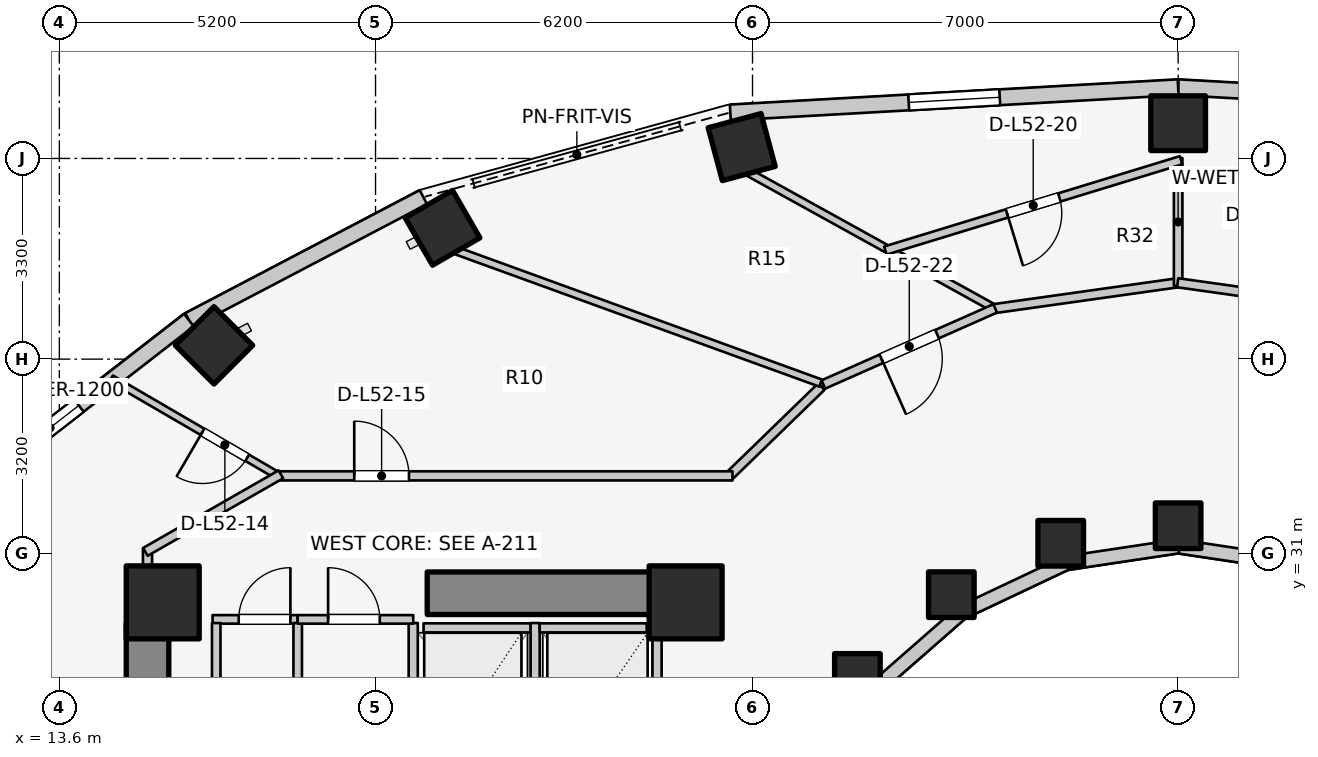
"""IFC4 building model, lengths in metres.
Left out: names, types, materials, properties, quantities, classifications, styles, units other than length and angle.
Written with IfcOpenShell. Run it as: python <this file> out.ifc"""

import sys

from ifc_helpers import new_model, si_unit, direction, frame, frame_2d, origin, origin_2d, place, context, subcontext, project, spatial, rectangle, extrude, element, fill, save


model = new_model("IFC4")
c1 = context("Model", 3, precision=1e-05, world=origin(), true_north=direction((0.0, 1.0)))
c2 = subcontext(c1, "Body", "Model", "MODEL_VIEW")
j1 = project(units=[si_unit("LENGTHUNIT", "METRE"), si_unit("PLANEANGLEUNIT", "RADIAN")], contexts=[c1])
p1 = place(None, origin())
s1 = spatial("IfcSite", under=j1, at=p1, CompositionType="ELEMENT")
p2 = place(p1, origin())
s2 = spatial("IfcBuilding", under=s1, at=p2, CompositionType="ELEMENT")
p3 = place(p2, frame((0.0, 0.0, 171.5)))
s3 = spatial("IfcBuildingStorey", under=s2, at=p3, CompositionType="ELEMENT", Elevation=171.5)
p4 = place(p3, frame((15.05, 17.05, 0.0), z_axis=(0.0, 0.0, 1.0), x_axis=(0.0, 1.0, 0.0)))
e1 = element("IfcWall", 1, at=p4, inside=s3, PredefinedType="SHEAR", context=c2, shape_type="SweptSolid", body=[
    extrude(rectangle(XDim=12.8, YDim=0.7, at=frame_2d((6.4, 0.0))), origin(), (0.0, 0.0, 1.0), 3.1),
])
p5 = place(p3, frame((19.65, 30.35, 0.0), z_axis=(0.0, 0.0, 1.0), x_axis=(1.0, 0.0, 0.0)))
e2 = element("IfcWall", 2, at=p5, inside=s3, PredefinedType="SHEAR", context=c2, shape_type="SweptSolid", body=[
    extrude(rectangle(XDim=4.5, YDim=0.7, at=frame_2d((2.25, 0.0))), origin(), (0.0, 0.0, 1.0), 3.1),
])
for number, where, z_axis, x_axis in (
    (3, (23.9, 30.2, 0.0), (0.0, 0.0, 1.0), (1.0, 0.0, 0.0)),
    (4, (15.3, 30.2, 0.0), (0.0, 0.0, 1.0), (1.0, 0.0, 0.0)),
):
    element("IfcColumn", number, at=place(p3, frame(where, z_axis=z_axis, x_axis=x_axis)), inside=s3, PredefinedType="COLUMN", context=c2, shape_type="SweptSolid", body=[
        extrude(rectangle(XDim=1.2, YDim=1.2, at=origin_2d()), origin(), (0.0, 0.0, 1.0), 3.1),
    ])
p6 = place(p3, frame((32.0, 31.46, 0.0), z_axis=(0.0, 0.0, 1.0), x_axis=(1.0, 0.0, 0.0)))
e5 = element("IfcColumn", 5, at=p6, inside=s3, PredefinedType="COLUMN", context=c2, shape_type="SweptSolid", body=[
    extrude(rectangle(XDim=0.75, YDim=0.75, at=origin_2d()), origin(), (0.0, 0.0, 1.0), 3.1),
])
p7 = place(p3, frame((32.0, 38.08, 0.0), z_axis=(0.0, 0.0, 1.0), x_axis=(0.0, 1.0, 0.0)))
e6 = element("IfcColumn", 6, at=p7, inside=s3, PredefinedType="COLUMN", context=c2, shape_type="SweptSolid", body=[
    extrude(rectangle(XDim=0.9, YDim=0.9, at=origin_2d()), origin(), (0.0, 0.0, 1.0), 3.1),
])
p8 = place(p3, frame((30.069, 31.172, 0.0), z_axis=(0.0, 0.0, 1.0), x_axis=(1.0, 0.0, 0.0)))
e7 = element("IfcColumn", 7, at=p8, inside=s3, PredefinedType="COLUMN", context=c2, shape_type="SweptSolid", body=[
    extrude(rectangle(XDim=0.75, YDim=0.75, at=origin_2d()), origin(), (0.0, 0.0, 1.0), 3.1),
])
p9 = place(p3, frame((24.822, 37.687, 0.0), z_axis=(0.0, 0.0, 1.0), x_axis=(-0.258819045103, 0.965925826289, 0.0)))
e8 = element("IfcColumn", 8, at=p9, inside=s3, PredefinedType="COLUMN", context=c2, shape_type="SweptSolid", body=[
    extrude(rectangle(XDim=0.9, YDim=0.9, at=origin_2d()), origin(), (0.0, 0.0, 1.0), 3.1),
])
p10 = place(p3, frame((28.27, 30.327, 0.0), z_axis=(0.0, 0.0, 1.0), x_axis=(1.0, 0.0, 0.0)))
e9 = element("IfcColumn", 9, at=p10, inside=s3, PredefinedType="COLUMN", context=c2, shape_type="SweptSolid", body=[
    extrude(rectangle(XDim=0.75, YDim=0.75, at=origin_2d()), origin(), (0.0, 0.0, 1.0), 3.1),
])
p11 = place(p3, frame((19.902, 36.359, 0.0), z_axis=(0.0, 0.0, 1.0), x_axis=(-0.5, 0.866025403784, 0.0)))
e10 = element("IfcColumn", 10, at=p11, inside=s3, PredefinedType="COLUMN", context=c2, shape_type="SweptSolid", body=[
    extrude(rectangle(XDim=0.9, YDim=0.9, at=origin_2d()), origin(), (0.0, 0.0, 1.0), 3.1),
])
p12 = place(p3, frame((26.725, 28.982, 0.0), z_axis=(0.0, 0.0, 1.0), x_axis=(1.0, 0.0, 0.0)))
e11 = element("IfcColumn", 11, at=p12, inside=s3, PredefinedType="COLUMN", context=c2, shape_type="SweptSolid", body=[
    extrude(rectangle(XDim=0.75, YDim=0.75, at=origin_2d()), origin(), (0.0, 0.0, 1.0), 3.1),
])
p13 = place(p3, frame((16.143, 34.427, 0.0), z_axis=(0.0, 0.0, 1.0), x_axis=(-0.707106781187, 0.707106781187, 0.0)))
e12 = element("IfcColumn", 12, at=p13, inside=s3, PredefinedType="COLUMN", context=c2, shape_type="SweptSolid", body=[
    extrude(rectangle(XDim=0.9, YDim=0.9, at=origin_2d()), origin(), (0.0, 0.0, 1.0), 3.1),
])
for number, where, z_axis, x_axis in (
    (13, (33.843, 30.843, 0.0), (0.0, 0.0, 1.0), (-0.989, 0.149, 0.0)),
    (14, (32.0, 31.12, 0.0), (0.0, 0.0, 1.0), (-0.989, -0.149, 0.0)),
):
    element("IfcWall", number, at=place(p3, frame(where, z_axis=z_axis, x_axis=x_axis)), inside=s3, PredefinedType="STANDARD", context=c2, shape_type="SweptSolid", body=[
        extrude(rectangle(XDim=1.864, YDim=0.23, at=frame_2d((0.932, 0.0))), origin(), (0.0, 0.0, 1.0), 2.16),
    ])
p14 = place(p3, frame((30.157, 30.843, 0.0), z_axis=(0.0, 0.0, 1.0), x_axis=(-0.904179699603, -0.427152280606, 0.0)))
e15 = element("IfcWall", 15, at=p14, inside=s3, PredefinedType="STANDARD", context=c2, shape_type="SweptSolid", body=[
    extrude(rectangle(XDim=1.899, YDim=0.23, at=frame_2d((0.95, 0.0))), origin(), (0.0, 0.0, 1.0), 2.16),
])
p15 = place(p3, frame((28.44, 30.032, 0.0), z_axis=(0.0, 0.0, 1.0), x_axis=(-0.752576694707, -0.658504607869, 0.0)))
e16 = element("IfcWall", 16, at=p15, inside=s3, PredefinedType="STANDARD", context=c2, shape_type="SweptSolid", body=[
    extrude(rectangle(XDim=1.959, YDim=0.23, at=frame_2d((0.98, 0.0))), origin(), (0.0, 0.0, 1.0), 2.16),
])
p16 = place(p3, frame((39.365, 38.257, 0.0), z_axis=(0.0, 0.0, 1.0), x_axis=(-0.998417906562, 0.056228852534, 0.0)))
e17 = element("IfcWall", 17, at=p16, inside=s3, PredefinedType="STANDARD", context=c2, shape_type="SweptSolid", body=[
    extrude(rectangle(XDim=7.377, YDim=0.26, at=frame_2d((3.688, 0.0))), origin(), (0.0, 0.0, 1.0), 2.85),
])
p17 = place(p16, frame((2.488, 0.0, 0.75)))
e18 = element("IfcOpeningElement", 18, at=p17, cuts=e17, PredefinedType="OPENING", context=c2, shape_type="SweptSolid", body=[
    extrude(rectangle(XDim=2.4, YDim=1.7, at=frame_2d((1.2, 0.85))), frame((0.0, 0.14, 0.0), z_axis=(0.0, -1.0, 0.0), x_axis=(1.0, 0.0, 0.0)), (0.0, 0.0, 1.0), 0.28),
])
p18 = place(p3, frame((32.0, 38.671, 0.0), z_axis=(0.0, 0.0, 1.0), x_axis=(-0.998417906562, -0.056228852534, 0.0)))
e19 = element("IfcWall", 19, at=p18, inside=s3, PredefinedType="STANDARD", context=c2, shape_type="SweptSolid", body=[
    extrude(rectangle(XDim=7.377, YDim=0.26, at=frame_2d((3.688, 0.0))), origin(), (0.0, 0.0, 1.0), 2.85),
])
p19 = place(p18, frame((2.938, 0.0, 0.75)))
e20 = element("IfcOpeningElement", 20, at=p19, cuts=e19, PredefinedType="OPENING", context=c2, shape_type="SweptSolid", body=[
    extrude(rectangle(XDim=1.5, YDim=1.6, at=frame_2d((0.75, 0.8))), frame((0.0, 0.14, 0.0), z_axis=(0.0, -1.0, 0.0), x_axis=(1.0, 0.0, 0.0)), (0.0, 0.0, 1.0), 0.28),
])
p20 = place(p3, frame((19.587, 36.863, 0.0), z_axis=(0.0, 0.0, 1.0), x_axis=(-0.885660265226, -0.464333818065, 0.0)))
e21 = element("IfcWall", 21, at=p20, inside=s3, PredefinedType="STANDARD", context=c2, shape_type="SweptSolid", body=[
    extrude(rectangle(XDim=4.354, YDim=0.26, at=frame_2d((2.177, 0.0))), origin(), (0.0, 0.0, 1.0), 2.85),
])
p21 = place(p3, frame((15.731, 34.842, 0.0), z_axis=(0.0, 0.0, 1.0), x_axis=(-0.790185650662, -0.612867552973, 0.0)))
e22 = element("IfcWall", 22, at=p21, inside=s3, PredefinedType="STANDARD", context=c2, shape_type="SweptSolid", body=[
    extrude(rectangle(XDim=4.239, YDim=0.26, at=frame_2d((2.12, 0.0))), origin(), (0.0, 0.0, 1.0), 2.85),
])
p22 = place(p21, frame((2.29, 0.0, 0.75)))
e23 = element("IfcOpeningElement", 23, at=p22, cuts=e22, PredefinedType="OPENING", context=c2, shape_type="SweptSolid", body=[
    extrude(rectangle(XDim=1.2, YDim=1.5, at=frame_2d((0.6, 0.75))), frame((0.0, 0.14, 0.0), z_axis=(0.0, -1.0, 0.0), x_axis=(1.0, 0.0, 0.0)), (0.0, 0.0, 1.0), 0.28),
])
p23 = place(p3, frame((19.59, 29.78, 0.0), z_axis=(0.0, 0.0, 1.0), x_axis=(1.0, 0.0, 0.0)))
e24 = element("IfcWall", 24, at=p23, inside=s3, PredefinedType="SOLIDWALL", context=c2, shape_type="SweptSolid", body=[
    extrude(rectangle(XDim=1.76, YDim=0.15, at=frame_2d((0.88, 0.0))), origin(), (0.0, 0.0, 1.0), 2.855),
])
for number, where, z_axis, x_axis in (
    (25, (19.42, 27.14, 0.0), (0.0, 0.0, 1.0), (0.0, 1.0, 0.0)),
    (26, (21.425, 27.14, 0.0), (0.0, 0.0, 1.0), (0.0, 1.0, 0.0)),
):
    element("IfcWall", number, at=place(p3, frame(where, z_axis=z_axis, x_axis=x_axis)), inside=s3, PredefinedType="SOLIDWALL", context=c2, shape_type="SweptSolid", body=[
        extrude(rectangle(XDim=2.72, YDim=0.15, at=frame_2d((1.36, 0.0))), origin(), (0.0, 0.0, 1.0), 2.855),
    ])
p24 = place(p3, frame((21.5, 29.78, 0.0), z_axis=(0.0, 0.0, 1.0), x_axis=(1.0, 0.0, 0.0)))
e27 = element("IfcWall", 27, at=p24, inside=s3, PredefinedType="SOLIDWALL", context=c2, shape_type="SweptSolid", body=[
    extrude(rectangle(XDim=1.76, YDim=0.15, at=frame_2d((0.88, 0.0))), origin(), (0.0, 0.0, 1.0), 2.855),
])
p25 = place(p3, frame((23.43, 27.14, 0.0), z_axis=(0.0, 0.0, 1.0), x_axis=(0.0, 1.0, 0.0)))
e28 = element("IfcWall", 28, at=p25, inside=s3, PredefinedType="SOLIDWALL", context=c2, shape_type="SweptSolid", body=[
    extrude(rectangle(XDim=2.72, YDim=0.15, at=frame_2d((1.36, 0.0))), origin(), (0.0, 0.0, 1.0), 2.855),
])
p26 = place(p3, frame((16.12, 29.92, 0.0), z_axis=(0.0, 0.0, 1.0), x_axis=(1.0, 0.0, 0.0)))
e29 = element("IfcWall", 29, at=p26, inside=s3, PredefinedType="PLUMBINGWALL", context=c2, shape_type="SweptSolid", body=[
    extrude(rectangle(XDim=1.4, YDim=0.14, at=frame_2d((0.7, 0.0))), origin(), (0.0, 0.0, 1.0), 2.855),
])
p27 = place(p26, frame((0.43, 0.0, 0.0)))
e30 = element("IfcOpeningElement", 30, at=p27, cuts=e29, PredefinedType="OPENING", context=c2, shape_type="SweptSolid", body=[
    extrude(rectangle(XDim=0.85, YDim=2.05, at=frame_2d((0.425, 1.025))), frame((0.0, 0.08, 0.0), z_axis=(0.0, -1.0, 0.0), x_axis=(1.0, 0.0, 0.0)), (0.0, 0.0, 1.0), 0.16),
])
for number, where, z_axis, x_axis in (
    (31, (16.18, 25.98, 0.0), (0.0, 0.0, 1.0), (0.0, 1.0, 0.0)),
    (32, (17.52, 25.98, 0.0), (0.0, 0.0, 1.0), (0.0, 1.0, 0.0)),
):
    element("IfcWall", number, at=place(p3, frame(where, z_axis=z_axis, x_axis=x_axis)), inside=s3, PredefinedType="PLUMBINGWALL", context=c2, shape_type="SweptSolid", body=[
        extrude(rectangle(XDim=3.88, YDim=0.14, at=frame_2d((1.94, 0.0))), origin(), (0.0, 0.0, 1.0), 2.855),
    ])
p28 = place(p3, frame((17.52, 29.92, 0.0), z_axis=(0.0, 0.0, 1.0), x_axis=(1.0, 0.0, 0.0)))
e33 = element("IfcWall", 33, at=p28, inside=s3, PredefinedType="PLUMBINGWALL", context=c2, shape_type="SweptSolid", body=[
    extrude(rectangle(XDim=1.9, YDim=0.14, at=frame_2d((0.95, 0.0))), origin(), (0.0, 0.0, 1.0), 2.855),
])
p29 = place(p28, frame((0.5, 0.0, 0.0)))
e34 = element("IfcOpeningElement", 34, at=p29, cuts=e33, PredefinedType="OPENING", context=c2, shape_type="SweptSolid", body=[
    extrude(rectangle(XDim=0.85, YDim=2.05, at=frame_2d((0.425, 1.025))), frame((0.0, 0.08, 0.0), z_axis=(0.0, -1.0, 0.0), x_axis=(1.0, 0.0, 0.0)), (0.0, 0.0, 1.0), 0.16),
])
p30 = place(p3, frame((15.05, 29.8, 0.0), z_axis=(0.0, 0.0, 1.0), x_axis=(0.0, 1.0, 0.0)))
e35 = element("IfcWall", 35, at=p30, inside=s3, PredefinedType="PARTITIONING", context=c2, shape_type="SweptSolid", body=[
    extrude(rectangle(XDim=1.29, YDim=0.15, at=frame_2d((0.645, 0.0))), origin(), (0.0, 0.0, 1.0), 2.855),
])
p31 = place(p3, frame((17.243, 32.255, 0.0), z_axis=(0.0, 0.0, 1.0), x_axis=(-0.864408655832, 0.502789892224, 0.0)))
e36 = element("IfcWall", 36, at=p31, inside=s3, PredefinedType="MOVABLE", context=c2, shape_type="SweptSolid", body=[
    extrude(rectangle(XDim=3.23, YDim=0.12, at=frame_2d((1.615, 0.0))), origin(), (0.0, 0.0, 1.0), 2.22),
])
p32 = place(p31, frame((0.641, 0.0, 0.0)))
e37 = element("IfcOpeningElement", 37, at=p32, cuts=e36, PredefinedType="OPENING", context=c2, shape_type="SweptSolid", body=[
    extrude(rectangle(XDim=0.85, YDim=2.05, at=frame_2d((0.425, 1.025))), frame((0.0, 0.07, 0.0), z_axis=(0.0, -1.0, 0.0), x_axis=(1.0, 0.0, 0.0)), (0.0, 0.0, 1.0), 0.14),
])
p33 = place(p3, frame((26.133, 33.749, 0.0), z_axis=(0.0, 0.0, 1.0), x_axis=(-0.717419568599, -0.696641344302, 0.0)))
e38 = element("IfcWall", 38, at=p33, inside=s3, PredefinedType="PARTITIONING", context=c2, shape_type="SweptSolid", body=[
    extrude(rectangle(XDim=2.138, YDim=0.15, at=frame_2d((1.069, 0.0))), origin(), (0.0, 0.0, 1.0), 2.299),
])
p34 = place(p3, frame((17.15, 32.28, 0.0), z_axis=(0.0, 0.0, 1.0), x_axis=(1.0, 0.0, 0.0)))
e39 = element("IfcWall", 39, at=p34, inside=s3, PredefinedType="PARTITIONING", context=c2, shape_type="SweptSolid", body=[
    extrude(rectangle(XDim=7.52, YDim=0.15, at=frame_2d((3.76, 0.0))), origin(), (0.0, 0.0, 1.0), 2.299),
])
p35 = place(p34, frame((1.3, 0.0, 0.0)))
e40 = element("IfcOpeningElement", 40, at=p35, cuts=e39, PredefinedType="OPENING", context=c2, shape_type="SweptSolid", body=[
    extrude(rectangle(XDim=0.9, YDim=2.1, at=frame_2d((0.45, 1.05))), frame((0.0, 0.085, 0.0), z_axis=(0.0, -1.0, 0.0), x_axis=(1.0, 0.0, 0.0)), (0.0, 0.0, 1.0), 0.17),
])
p36 = place(p3, frame((17.243, 32.305, 0.0), z_axis=(0.0, 0.0, 1.0), x_axis=(-0.867991349648, -0.496579315857, 0.0)))
e41 = element("IfcWall", 41, at=p36, inside=s3, PredefinedType="PARTITIONING", context=c2, shape_type="SweptSolid", body=[
    extrude(rectangle(XDim=2.567, YDim=0.15, at=frame_2d((1.283, 0.0))), origin(), (0.0, 0.0, 1.0), 2.22),
])
p37 = place(p3, frame((28.935, 35.058, 0.0), z_axis=(0.0, 0.0, 1.0), x_axis=(-0.875077338582, 0.48398311076, 0.0)))
e42 = element("IfcWall", 42, at=p37, inside=s3, PredefinedType="PARTITIONING", context=c2, shape_type="SweptSolid", body=[
    extrude(rectangle(XDim=4.573, YDim=0.125, at=frame_2d((2.287, 0.0))), origin(), (0.0, 0.0, 1.0), 2.299),
])
p38 = place(p3, frame((26.12, 33.806, 0.0), z_axis=(0.0, 0.0, 1.0), x_axis=(-0.939901628116, 0.341445353557, 0.0)))
e43 = element("IfcWall", 43, at=p38, inside=s3, PredefinedType="PARTITIONING", context=c2, shape_type="SweptSolid", body=[
    extrude(rectangle(XDim=6.387, YDim=0.125, at=frame_2d((3.194, 0.0))), origin(), (0.0, 0.0, 1.0), 2.299),
])
p39 = place(p3, frame((32.05, 35.463, 0.0), z_axis=(0.0, 0.0, 1.0), x_axis=(-0.990254405439, -0.139270285808, 0.0)))
e44 = element("IfcWall", 44, at=p39, inside=s3, PredefinedType="PARTITIONING", context=c2, shape_type="SweptSolid", body=[
    extrude(rectangle(XDim=3.147, YDim=0.15, at=frame_2d((1.573, 0.0))), origin(), (0.0, 0.0, 1.0), 2.299),
])
p40 = place(p3, frame((32.0, 35.406, 0.0), z_axis=(0.0, 0.0, 1.0), x_axis=(0.0, 1.0, 0.0)))
e45 = element("IfcWall", 45, at=p40, inside=s3, PredefinedType="PLUMBINGWALL", context=c2, shape_type="SweptSolid", body=[
    extrude(rectangle(XDim=2.1, YDim=0.14, at=frame_2d((1.05, 0.0))), origin(), (0.0, 0.0, 1.0), 2.299),
])
p41 = place(p3, frame((32.048, 37.471, 0.0), z_axis=(0.0, 0.0, 1.0), x_axis=(-0.956348216259, -0.292229514694, 0.0)))
e46 = element("IfcWall", 46, at=p41, inside=s3, PredefinedType="PLUMBINGWALL", context=c2, shape_type="SweptSolid", body=[
    extrude(rectangle(XDim=5.084, YDim=0.14, at=frame_2d((2.542, 0.0))), origin(), (0.0, 0.0, 1.0), 2.299),
])
p42 = place(p41, frame((2.092, 0.0, 0.0)))
e47 = element("IfcOpeningElement", 47, at=p42, cuts=e46, PredefinedType="OPENING", context=c2, shape_type="SweptSolid", body=[
    extrude(rectangle(XDim=0.9, YDim=2.1, at=frame_2d((0.45, 1.05))), frame((0.0, 0.08, 0.0), z_axis=(0.0, -1.0, 0.0), x_axis=(1.0, 0.0, 0.0)), (0.0, 0.0, 1.0), 0.16),
])
p43 = place(p3, frame((35.025, 35.029, 0.0), z_axis=(0.0, 0.0, 1.0), x_axis=(-0.990243864279, 0.139345216129, 0.0)))
e48 = element("IfcWall", 48, at=p43, inside=s3, PredefinedType="PARTITIONING", context=c2, shape_type="SweptSolid", body=[
    extrude(rectangle(XDim=3.062, YDim=0.15, at=frame_2d((1.531, 0.0))), origin(), (0.0, 0.0, 1.0), 2.299),
])
p44 = place(p43, frame((1.031, 0.0, 0.0)))
e49 = element("IfcOpeningElement", 49, at=p44, cuts=e48, PredefinedType="OPENING", context=c2, shape_type="SweptSolid", body=[
    extrude(rectangle(XDim=1.0, YDim=2.1, at=frame_2d((0.5, 1.05))), frame((0.0, 0.085, 0.0), z_axis=(0.0, -1.0, 0.0), x_axis=(1.0, 0.0, 0.0)), (0.0, 0.0, 1.0), 0.17),
])
p45 = place(p3, frame((28.991, 35.034, 0.0), z_axis=(0.0, 0.0, 1.0), x_axis=(-0.91445214467, -0.404694051239, 0.0)))
e50 = element("IfcWall", 50, at=p45, inside=s3, PredefinedType="PARTITIONING", context=c2, shape_type="SweptSolid", body=[
    extrude(rectangle(XDim=3.091, YDim=0.15, at=frame_2d((1.545, 0.0))), origin(), (0.0, 0.0, 1.0), 2.299),
])
p46 = place(p45, frame((1.045, 0.0, 0.0)))
e51 = element("IfcOpeningElement", 51, at=p46, cuts=e50, PredefinedType="OPENING", context=c2, shape_type="SweptSolid", body=[
    extrude(rectangle(XDim=1.0, YDim=2.1, at=frame_2d((0.5, 1.05))), frame((0.0, 0.085, 0.0), z_axis=(0.0, -1.0, 0.0), x_axis=(1.0, 0.0, 0.0)), (0.0, 0.0, 1.0), 0.17),
])
p47 = place(p19, origin())
e52 = element("IfcWindow", 52, at=p47, inside=s3, PartitioningType="SINGLE_PANEL", PredefinedType="WINDOW", context=c2, shape_type="SweptSolid", body=[
    extrude(rectangle(XDim=1.5, YDim=1.6, at=frame_2d((0.75, 0.8))), frame((0.0, 0.03, 0.0), z_axis=(0.0, -1.0, 0.0), x_axis=(1.0, 0.0, 0.0)), (0.0, 0.0, 1.0), 0.06),
])
fill(e20, e52)
p48 = place(p22, origin())
e53 = element("IfcWindow", 53, at=p48, inside=s3, PartitioningType="SINGLE_PANEL", PredefinedType="WINDOW", context=c2, shape_type="SweptSolid", body=[
    extrude(rectangle(XDim=1.2, YDim=1.5, at=frame_2d((0.6, 0.75))), frame((0.0, 0.03, 0.0), z_axis=(0.0, -1.0, 0.0), x_axis=(1.0, 0.0, 0.0)), (0.0, 0.0, 1.0), 0.06),
])
fill(e23, e53)
p49 = place(p27, origin())
e54 = element("IfcDoor", 54, at=p49, inside=s3, OperationType="SINGLE_SWING_RIGHT", PredefinedType="DOOR", context=c2, shape_type="SweptSolid", body=[
    extrude(rectangle(XDim=0.85, YDim=2.05, at=frame_2d((0.425, 1.025))), frame((0.0, 0.025, 0.0), z_axis=(0.0, -1.0, 0.0), x_axis=(1.0, 0.0, 0.0)), (0.0, 0.0, 1.0), 0.05),
])
fill(e30, e54)
p50 = place(p29, origin())
e55 = element("IfcDoor", 55, at=p50, inside=s3, OperationType="SINGLE_SWING_LEFT", PredefinedType="DOOR", context=c2, shape_type="SweptSolid", body=[
    extrude(rectangle(XDim=0.85, YDim=2.05, at=frame_2d((0.425, 1.025))), frame((0.0, 0.025, 0.0), z_axis=(0.0, -1.0, 0.0), x_axis=(1.0, 0.0, 0.0)), (0.0, 0.0, 1.0), 0.05),
])
fill(e34, e55)
p51 = place(p32, origin())
e56 = element("IfcDoor", 56, at=p51, inside=s3, OperationType="SINGLE_SWING_RIGHT", PredefinedType="DOOR", context=c2, shape_type="SweptSolid", body=[
    extrude(rectangle(XDim=0.85, YDim=2.05, at=frame_2d((0.425, 1.025))), frame((0.0, 0.025, 0.0), z_axis=(0.0, -1.0, 0.0), x_axis=(1.0, 0.0, 0.0)), (0.0, 0.0, 1.0), 0.05),
])
fill(e37, e56)
p52 = place(p35, origin())
e57 = element("IfcDoor", 57, at=p52, inside=s3, OperationType="SINGLE_SWING_LEFT", PredefinedType="DOOR", context=c2, shape_type="SweptSolid", body=[
    extrude(rectangle(XDim=0.9, YDim=2.1, at=frame_2d((0.45, 1.05))), frame((0.0, 0.025, 0.0), z_axis=(0.0, -1.0, 0.0), x_axis=(1.0, 0.0, 0.0)), (0.0, 0.0, 1.0), 0.05),
])
fill(e40, e57)
p53 = place(p42, origin())
e58 = element("IfcDoor", 58, at=p53, inside=s3, OperationType="SINGLE_SWING_RIGHT", PredefinedType="DOOR", context=c2, shape_type="SweptSolid", body=[
    extrude(rectangle(XDim=0.9, YDim=2.1, at=frame_2d((0.45, 1.05))), frame((0.0, 0.025, 0.0), z_axis=(0.0, -1.0, 0.0), x_axis=(1.0, 0.0, 0.0)), (0.0, 0.0, 1.0), 0.05),
])
fill(e47, e58)
p54 = place(p46, origin())
e59 = element("IfcDoor", 59, at=p54, inside=s3, OperationType="SINGLE_SWING_RIGHT", PredefinedType="DOOR", context=c2, shape_type="SweptSolid", body=[
    extrude(rectangle(XDim=1.0, YDim=2.1, at=frame_2d((0.5, 1.05))), frame((0.0, 0.025, 0.0), z_axis=(0.0, -1.0, 0.0), x_axis=(1.0, 0.0, 0.0)), (0.0, 0.0, 1.0), 0.05),
])
fill(e51, e59)
save(model, sys.argv[1])
